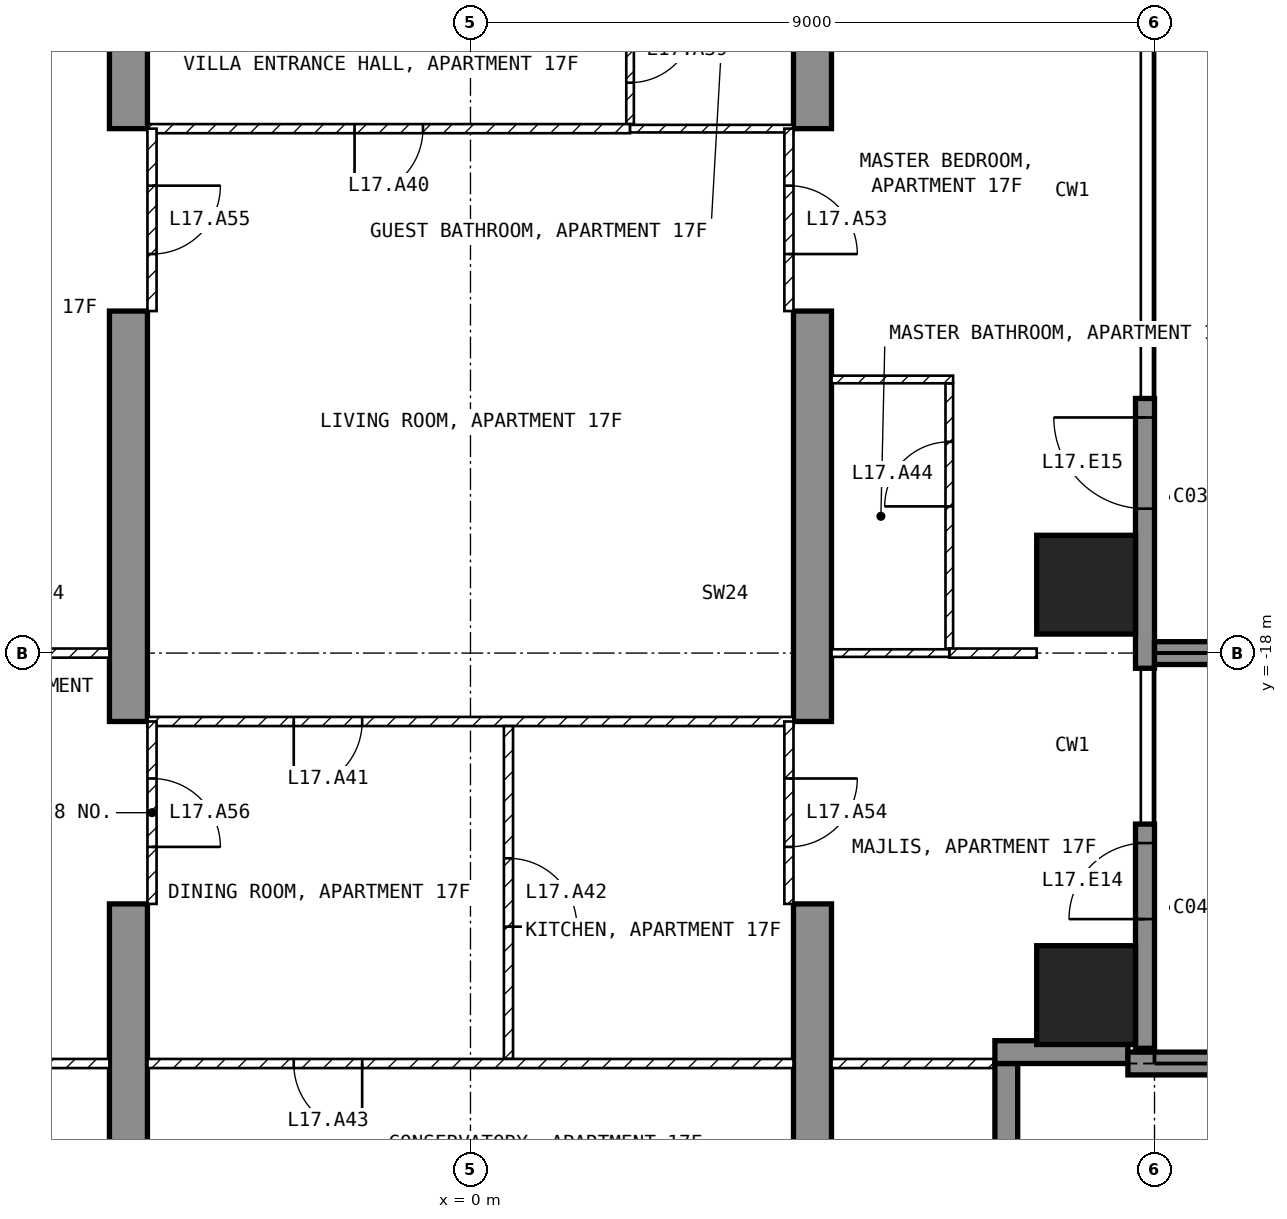
"""IFC4 building model, lengths in metres.
Left out: names, types, materials, properties, quantities, classifications, styles, units other than length and angle.
Written with IfcOpenShell. Run it as: python <this file> out.ifc"""

import sys

from ifc_helpers import new_model, si_unit, direction, frame, frame_2d, origin, origin_2d, place, context, subcontext, project, spatial, polyline, rectangle, outline, extrude, element, fill, save


model = new_model("IFC4")
c1 = context("Model", 3, precision=1e-05, world=origin(), true_north=direction((0.0, 1.0)))
c2 = subcontext(c1, "Body", "Model", "MODEL_VIEW")
j1 = project(units=[si_unit("LENGTHUNIT", "METRE"), si_unit("PLANEANGLEUNIT", "RADIAN")], contexts=[c1])
p1 = place(None, origin())
s1 = spatial("IfcSite", under=j1, at=p1, CompositionType="ELEMENT")
p2 = place(p1, origin())
s2 = spatial("IfcBuilding", under=s1, at=p2, CompositionType="ELEMENT")
p3 = place(p2, frame((0.0, 0.0, 78.5)))
s3 = spatial("IfcBuildingStorey", under=s2, at=p3, CompositionType="ELEMENT", Elevation=78.5)
for number, where, z_axis, x_axis in (
    (1, (8.1, -22.5, -0.25), (0.0, 0.0, 1.0), (1.0, 0.0, 0.0)),
    (2, (8.1, -17.1, -0.25), (0.0, 0.0, 1.0), (1.0, 0.0, 0.0)),
):
    element("IfcColumn", number, at=place(p3, frame(where, z_axis=z_axis, x_axis=x_axis)), inside=s3, PredefinedType="COLUMN", context=c2, shape_type="SweptSolid", body=[
        extrude(rectangle(XDim=1.3, YDim=1.3, at=origin_2d()), origin(), (0.0, 0.0, 1.0), 3.5),
    ])
for number, where, z_axis, x_axis in (
    (3, (-4.75, -25.45, -0.25), (1.0, 0.0, 0.0), (0.0, 1.0, 0.0)),
    (4, (4.25, -25.45, -0.25), (1.0, 0.0, 0.0), (0.0, 1.0, 0.0)),
):
    element("IfcWall", number, at=place(p3, frame(where, z_axis=z_axis, x_axis=x_axis)), inside=s3, PredefinedType="SHEAR", context=c2, shape_type="SweptSolid", body=[
        extrude(outline(polyline([(0.0, 0.0), (4.15, 0.0), (4.15, 2.65), (6.55, 2.65), (6.55, 0.0), (11.95, 0.0), (11.95, 2.65), (14.35, 2.65), (14.35, 0.0), (16.45, 0.0), (16.45, 3.5), (0.0, 3.5), (0.0, 0.0)])), origin(), (0.0, 0.0, 1.0), 0.5),
    ])
p4 = place(p3, frame((8.875, -23.2, 0.0), z_axis=(0.0, 0.0, 1.0), x_axis=(0.0, 1.0, 0.0)))
e5 = element("IfcWall", 5, at=p4, inside=s3, PredefinedType="SOLIDWALL", context=c2, shape_type="SweptSolid", body=[
    extrude(rectangle(XDim=2.95, YDim=0.25, at=frame_2d((1.475, 0.0))), origin(), (0.0, 0.0, 1.0), 3.25),
])
p5 = place(p4, frame((1.7, 0.0, 0.0)))
e6 = element("IfcOpeningElement", 6, at=p5, cuts=e5, PredefinedType="OPENING", context=c2, shape_type="SweptSolid", body=[
    extrude(rectangle(XDim=1.0, YDim=2.4, at=frame_2d((0.5, 1.2))), frame((0.0, 0.135, 0.0), z_axis=(0.0, -1.0, 0.0), x_axis=(1.0, 0.0, 0.0)), (0.0, 0.0, 1.0), 0.27),
])
p6 = place(p3, frame((8.875, -18.2, 0.0), z_axis=(0.0, 0.0, 1.0), x_axis=(0.0, 1.0, 0.0)))
e7 = element("IfcWall", 7, at=p6, inside=s3, PredefinedType="SOLIDWALL", context=c2, shape_type="SweptSolid", body=[
    extrude(rectangle(XDim=3.55, YDim=0.25, at=frame_2d((1.775, 0.0))), origin(), (0.0, 0.0, 1.0), 3.25),
])
p7 = place(p6, frame((2.1, 0.0, 0.0)))
e8 = element("IfcOpeningElement", 8, at=p7, cuts=e7, PredefinedType="OPENING", context=c2, shape_type="SweptSolid", body=[
    extrude(rectangle(XDim=1.2, YDim=2.4, at=frame_2d((0.6, 1.2))), frame((0.0, 0.135, 0.0), z_axis=(0.0, -1.0, 0.0), x_axis=(1.0, 0.0, 0.0)), (0.0, 0.0, 1.0), 0.27),
])
p8 = place(p3, frame((7.05, -25.2, 0.0), z_axis=(0.0, 0.0, 1.0), x_axis=(0.0, 1.0, 0.0)))
e9 = element("IfcWall", 9, at=p8, inside=s3, PredefinedType="SOLIDWALL", context=c2, shape_type="SweptSolid", body=[
    extrude(rectangle(XDim=1.8, YDim=0.3, at=frame_2d((0.9, 0.0))), origin(), (0.0, 0.0, 1.0), 3.25),
])
p9 = place(p3, frame((6.9, -23.25, 0.0), z_axis=(0.0, 0.0, 1.0), x_axis=(1.0, 0.0, 0.0)))
e10 = element("IfcWall", 10, at=p9, inside=s3, PredefinedType="SOLIDWALL", context=c2, shape_type="SweptSolid", body=[
    extrude(rectangle(XDim=1.75, YDim=0.3, at=frame_2d((0.875, 0.0))), origin(), (0.0, 0.0, 1.0), 3.25),
])
p10 = place(p3, frame((8.65, -23.4, 0.0), z_axis=(0.0, 0.0, 1.0), x_axis=(1.0, 0.0, 0.0)))
e11 = element("IfcWall", 11, at=p10, inside=s3, PredefinedType="SOLIDWALL", context=c2, shape_type="SweptSolid", body=[
    extrude(rectangle(XDim=3.05, YDim=0.3, at=frame_2d((1.525, 0.0))), origin(), (0.0, 0.0, 1.0), 3.25),
])
p11 = place(p3, frame((9.0, -18.0, 0.0), z_axis=(0.0, 0.0, 1.0), x_axis=(1.0, 0.0, 0.0)))
e12 = element("IfcWall", 12, at=p11, inside=s3, PredefinedType="SOLIDWALL", context=c2, shape_type="SweptSolid", body=[
    extrude(rectangle(XDim=2.7, YDim=0.3, at=frame_2d((1.35, 0.0))), origin(), (0.0, 0.0, 1.0), 3.25),
])
p12 = place(p3, frame((2.1, -9.1, 0.0), z_axis=(0.0, 0.0, 1.0), x_axis=(0.0, -1.0, 0.0)))
e13 = element("IfcWall", 13, at=p12, inside=s3, PredefinedType="PARTITIONING", context=c2, shape_type="SweptSolid", body=[
    extrude(rectangle(XDim=1.94, YDim=0.1, at=frame_2d((0.97, 0.0))), origin(), (0.0, 0.0, 1.0), 3.25),
])
p13 = place(p12, frame((0.545, 0.0, 0.0)))
e14 = element("IfcOpeningElement", 14, at=p13, cuts=e13, PredefinedType="OPENING", context=c2, shape_type="SweptSolid", body=[
    extrude(rectangle(XDim=0.85, YDim=2.1, at=frame_2d((0.425, 1.05))), frame((0.0, 0.06, 0.0), z_axis=(0.0, -1.0, 0.0), x_axis=(1.0, 0.0, 0.0)), (0.0, 0.0, 1.0), 0.12),
])
p14 = place(p3, frame((2.1, -11.1, 0.0), z_axis=(0.0, 0.0, 1.0), x_axis=(-1.0, 0.0, 0.0)))
e15 = element("IfcWall", 15, at=p14, inside=s3, PredefinedType="PARTITIONING", context=c2, shape_type="SweptSolid", body=[
    extrude(rectangle(XDim=6.35, YDim=0.12, at=frame_2d((3.175, 0.0))), origin(), (0.0, 0.0, 1.0), 3.25),
])
p15 = place(p14, frame((2.725, 0.0, 0.0)))
e16 = element("IfcOpeningElement", 16, at=p15, cuts=e15, PredefinedType="OPENING", context=c2, shape_type="SweptSolid", body=[
    extrude(rectangle(XDim=0.9, YDim=2.1, at=frame_2d((0.45, 1.05))), frame((0.0, 0.07, 0.0), z_axis=(0.0, -1.0, 0.0), x_axis=(1.0, 0.0, 0.0)), (0.0, 0.0, 1.0), 0.14),
])
p16 = place(p3, frame((4.25, -11.1, 0.0), z_axis=(0.0, 0.0, 1.0), x_axis=(-1.0, 0.0, 0.0)))
e17 = element("IfcWall", 17, at=p16, inside=s3, PredefinedType="PARTITIONING", context=c2, shape_type="SweptSolid", body=[
    extrude(rectangle(XDim=2.15, YDim=0.1, at=frame_2d((1.075, 0.0))), origin(), (0.0, 0.0, 1.0), 3.25),
])
p17 = place(p3, frame((4.25, -18.9, 0.0), z_axis=(0.0, 0.0, 1.0), x_axis=(-1.0, 0.0, 0.0)))
e18 = element("IfcWall", 18, at=p17, inside=s3, PredefinedType="PARTITIONING", context=c2, shape_type="SweptSolid", body=[
    extrude(rectangle(XDim=8.5, YDim=0.12, at=frame_2d((4.25, 0.0))), origin(), (0.0, 0.0, 1.0), 3.25),
])
p18 = place(p17, frame((5.675, 0.0, 0.0)))
e19 = element("IfcOpeningElement", 19, at=p18, cuts=e18, PredefinedType="OPENING", context=c2, shape_type="SweptSolid", body=[
    extrude(rectangle(XDim=0.9, YDim=2.1, at=frame_2d((0.45, 1.05))), frame((0.0, 0.07, 0.0), z_axis=(0.0, -1.0, 0.0), x_axis=(1.0, 0.0, 0.0)), (0.0, 0.0, 1.0), 0.14),
])
p19 = place(p3, frame((0.5, -18.96, 0.0), z_axis=(0.0, 0.0, 1.0), x_axis=(0.0, -1.0, 0.0)))
e20 = element("IfcWall", 20, at=p19, inside=s3, PredefinedType="PARTITIONING", context=c2, shape_type="SweptSolid", body=[
    extrude(rectangle(XDim=4.38, YDim=0.12, at=frame_2d((2.19, 0.0))), origin(), (0.0, 0.0, 1.0), 3.25),
])
p20 = place(p19, frame((1.74, 0.0, 0.0)))
e21 = element("IfcOpeningElement", 21, at=p20, cuts=e20, PredefinedType="OPENING", context=c2, shape_type="SweptSolid", body=[
    extrude(rectangle(XDim=0.9, YDim=2.1, at=frame_2d((0.45, 1.05))), frame((0.0, 0.07, 0.0), z_axis=(0.0, -1.0, 0.0), x_axis=(1.0, 0.0, 0.0)), (0.0, 0.0, 1.0), 0.14),
])
p21 = place(p3, frame((4.25, -23.4, 0.0), z_axis=(0.0, 0.0, 1.0), x_axis=(-1.0, 0.0, 0.0)))
e22 = element("IfcWall", 22, at=p21, inside=s3, PredefinedType="PARTITIONING", context=c2, shape_type="SweptSolid", body=[
    extrude(rectangle(XDim=8.5, YDim=0.12, at=frame_2d((4.25, 0.0))), origin(), (0.0, 0.0, 1.0), 3.25),
])
p22 = place(p21, frame((5.675, 0.0, 0.0)))
e23 = element("IfcOpeningElement", 23, at=p22, cuts=e22, PredefinedType="OPENING", context=c2, shape_type="SweptSolid", body=[
    extrude(rectangle(XDim=0.9, YDim=2.1, at=frame_2d((0.45, 1.05))), frame((0.0, 0.07, 0.0), z_axis=(0.0, -1.0, 0.0), x_axis=(1.0, 0.0, 0.0)), (0.0, 0.0, 1.0), 0.14),
])
p23 = place(p3, frame((6.3, -17.94, 0.0), z_axis=(0.0, 0.0, 1.0), x_axis=(0.0, 1.0, 0.0)))
e24 = element("IfcWall", 24, at=p23, inside=s3, PredefinedType="PARTITIONING", context=c2, shape_type="SweptSolid", body=[
    extrude(rectangle(XDim=3.49, YDim=0.1, at=frame_2d((1.745, 0.0))), origin(), (0.0, 0.0, 1.0), 3.25),
])
p24 = place(p23, frame((1.87, 0.0, 0.0)))
e25 = element("IfcOpeningElement", 25, at=p24, cuts=e24, PredefinedType="OPENING", context=c2, shape_type="SweptSolid", body=[
    extrude(rectangle(XDim=0.85, YDim=2.1, at=frame_2d((0.425, 1.05))), frame((0.0, 0.06, 0.0), z_axis=(0.0, -1.0, 0.0), x_axis=(1.0, 0.0, 0.0)), (0.0, 0.0, 1.0), 0.12),
])
p25 = place(p3, frame((6.35, -14.4, 0.0), z_axis=(0.0, 0.0, 1.0), x_axis=(-1.0, 0.0, 0.0)))
e26 = element("IfcWall", 26, at=p25, inside=s3, PredefinedType="PARTITIONING", context=c2, shape_type="SweptSolid", body=[
    extrude(rectangle(XDim=1.6, YDim=0.1, at=frame_2d((0.8, 0.0))), origin(), (0.0, 0.0, 1.0), 3.25),
])
p26 = place(p3, frame((7.45, -18.0, 0.0), z_axis=(0.0, 0.0, 1.0), x_axis=(-1.0, 0.0, 0.0)))
e27 = element("IfcWall", 27, at=p26, inside=s3, PredefinedType="PARTITIONING", context=c2, shape_type="SweptSolid", body=[
    extrude(rectangle(XDim=1.15, YDim=0.12, at=frame_2d((0.575, 0.0))), origin(), (0.0, 0.0, 1.0), 3.25),
])
p27 = place(p3, frame((6.3, -18.0, 0.0), z_axis=(0.0, 0.0, 1.0), x_axis=(-1.0, 0.0, 0.0)))
e28 = element("IfcWall", 28, at=p27, inside=s3, PredefinedType="PARTITIONING", context=c2, shape_type="SweptSolid", body=[
    extrude(rectangle(XDim=1.55, YDim=0.1, at=frame_2d((0.775, 0.0))), origin(), (0.0, 0.0, 1.0), 3.25),
])
p28 = place(p3, frame((7.12, -23.4, 0.0), z_axis=(0.0, 0.0, 1.0), x_axis=(-1.0, 0.0, 0.0)))
e29 = element("IfcWall", 29, at=p28, inside=s3, PredefinedType="PARTITIONING", context=c2, shape_type="SweptSolid", body=[
    extrude(rectangle(XDim=2.37, YDim=0.12, at=frame_2d((1.185, 0.0))), origin(), (0.0, 0.0, 1.0), 3.25),
])
p29 = place(p3, frame((-4.75, -18.0, 0.0), z_axis=(0.0, 0.0, 1.0), x_axis=(-1.0, 0.0, 0.0)))
e30 = element("IfcWall", 30, at=p29, inside=s3, PredefinedType="PARTITIONING", context=c2, shape_type="SweptSolid", body=[
    extrude(rectangle(XDim=2.7, YDim=0.12, at=frame_2d((1.35, 0.0))), origin(), (0.0, 0.0, 1.0), 3.25),
])
p30 = place(p3, frame((-4.75, -23.4, 0.0), z_axis=(0.0, 0.0, 1.0), x_axis=(-1.0, 0.0, 0.0)))
e31 = element("IfcWall", 31, at=p30, inside=s3, PredefinedType="PARTITIONING", context=c2, shape_type="SweptSolid", body=[
    extrude(rectangle(XDim=2.37, YDim=0.12, at=frame_2d((1.185, 0.0))), origin(), (0.0, 0.0, 1.0), 3.25),
])
p31 = place(p3, frame((4.19, -11.1, 0.0), z_axis=(0.0, 0.0, 1.0), x_axis=(0.0, -1.0, 0.0)))
e32 = element("IfcWall", 32, at=p31, inside=s3, PredefinedType="PARTITIONING", context=c2, shape_type="SweptSolid", body=[
    extrude(rectangle(XDim=2.4, YDim=0.12, at=frame_2d((1.2, 0.0))), origin(), (0.0, 0.0, 1.0), 2.4),
])
p32 = place(p31, frame((0.75, 0.0, 0.0)))
e33 = element("IfcOpeningElement", 33, at=p32, cuts=e32, PredefinedType="OPENING", context=c2, shape_type="SweptSolid", body=[
    extrude(rectangle(XDim=0.9, YDim=2.1, at=frame_2d((0.45, 1.05))), frame((0.0, 0.07, 0.0), z_axis=(0.0, -1.0, 0.0), x_axis=(1.0, 0.0, 0.0)), (0.0, 0.0, 1.0), 0.14),
])
p33 = place(p3, frame((4.19, -18.9, 0.0), z_axis=(0.0, 0.0, 1.0), x_axis=(0.0, -1.0, 0.0)))
e34 = element("IfcWall", 34, at=p33, inside=s3, PredefinedType="PARTITIONING", context=c2, shape_type="SweptSolid", body=[
    extrude(rectangle(XDim=2.4, YDim=0.12, at=frame_2d((1.2, 0.0))), origin(), (0.0, 0.0, 1.0), 2.4),
])
p34 = place(p33, frame((0.75, 0.0, 0.0)))
e35 = element("IfcOpeningElement", 35, at=p34, cuts=e34, PredefinedType="OPENING", context=c2, shape_type="SweptSolid", body=[
    extrude(rectangle(XDim=0.9, YDim=2.1, at=frame_2d((0.45, 1.05))), frame((0.0, 0.07, 0.0), z_axis=(0.0, -1.0, 0.0), x_axis=(1.0, 0.0, 0.0)), (0.0, 0.0, 1.0), 0.14),
])
p35 = place(p3, frame((-4.19, -11.1, 0.0), z_axis=(0.0, 0.0, 1.0), x_axis=(0.0, -1.0, 0.0)))
e36 = element("IfcWall", 36, at=p35, inside=s3, PredefinedType="PARTITIONING", context=c2, shape_type="SweptSolid", body=[
    extrude(rectangle(XDim=2.4, YDim=0.12, at=frame_2d((1.2, 0.0))), origin(), (0.0, 0.0, 1.0), 2.4),
])
p36 = place(p35, frame((0.75, 0.0, 0.0)))
e37 = element("IfcOpeningElement", 37, at=p36, cuts=e36, PredefinedType="OPENING", context=c2, shape_type="SweptSolid", body=[
    extrude(rectangle(XDim=0.9, YDim=2.1, at=frame_2d((0.45, 1.05))), frame((0.0, 0.07, 0.0), z_axis=(0.0, -1.0, 0.0), x_axis=(1.0, 0.0, 0.0)), (0.0, 0.0, 1.0), 0.14),
])
p37 = place(p3, frame((-4.19, -18.9, 0.0), z_axis=(0.0, 0.0, 1.0), x_axis=(0.0, -1.0, 0.0)))
e38 = element("IfcWall", 38, at=p37, inside=s3, PredefinedType="PARTITIONING", context=c2, shape_type="SweptSolid", body=[
    extrude(rectangle(XDim=2.4, YDim=0.12, at=frame_2d((1.2, 0.0))), origin(), (0.0, 0.0, 1.0), 2.4),
])
p38 = place(p37, frame((0.75, 0.0, 0.0)))
e39 = element("IfcOpeningElement", 39, at=p38, cuts=e38, PredefinedType="OPENING", context=c2, shape_type="SweptSolid", body=[
    extrude(rectangle(XDim=0.9, YDim=2.1, at=frame_2d((0.45, 1.05))), frame((0.0, 0.07, 0.0), z_axis=(0.0, -1.0, 0.0), x_axis=(1.0, 0.0, 0.0)), (0.0, 0.0, 1.0), 0.14),
])
p39 = place(p5, origin())
e40 = element("IfcDoor", 40, at=p39, inside=s3, OperationType="SINGLE_SWING_LEFT", PredefinedType="DOOR", context=c2, shape_type="SweptSolid", body=[
    extrude(rectangle(XDim=1.0, YDim=2.4, at=frame_2d((0.5, 1.2))), frame((0.0, 0.025, 0.0), z_axis=(0.0, -1.0, 0.0), x_axis=(1.0, 0.0, 0.0)), (0.0, 0.0, 1.0), 0.05),
])
fill(e6, e40)
p40 = place(p7, origin())
e41 = element("IfcDoor", 41, at=p40, inside=s3, OperationType="SINGLE_SWING_RIGHT", PredefinedType="DOOR", context=c2, shape_type="SweptSolid", body=[
    extrude(rectangle(XDim=1.2, YDim=2.4, at=frame_2d((0.6, 1.2))), frame((0.0, 0.025, 0.0), z_axis=(0.0, -1.0, 0.0), x_axis=(1.0, 0.0, 0.0)), (0.0, 0.0, 1.0), 0.05),
])
fill(e8, e41)
p41 = place(p13, origin())
e42 = element("IfcDoor", 42, at=p41, inside=s3, OperationType="SINGLE_SWING_LEFT", PredefinedType="DOOR", context=c2, shape_type="SweptSolid", body=[
    extrude(rectangle(XDim=0.85, YDim=2.1, at=frame_2d((0.425, 1.05))), frame((0.0, 0.025, 0.0), z_axis=(0.0, -1.0, 0.0), x_axis=(1.0, 0.0, 0.0)), (0.0, 0.0, 1.0), 0.05),
])
fill(e14, e42)
p42 = place(p15, origin())
e43 = element("IfcDoor", 43, at=p42, inside=s3, OperationType="SINGLE_SWING_RIGHT", PredefinedType="DOOR", context=c2, shape_type="SweptSolid", body=[
    extrude(rectangle(XDim=0.9, YDim=2.1, at=frame_2d((0.45, 1.05))), frame((0.0, 0.025, 0.0), z_axis=(0.0, -1.0, 0.0), x_axis=(1.0, 0.0, 0.0)), (0.0, 0.0, 1.0), 0.05),
])
fill(e16, e43)
p43 = place(p18, origin())
e44 = element("IfcDoor", 44, at=p43, inside=s3, OperationType="SINGLE_SWING_RIGHT", PredefinedType="DOOR", context=c2, shape_type="SweptSolid", body=[
    extrude(rectangle(XDim=0.9, YDim=2.1, at=frame_2d((0.45, 1.05))), frame((0.0, 0.025, 0.0), z_axis=(0.0, -1.0, 0.0), x_axis=(1.0, 0.0, 0.0)), (0.0, 0.0, 1.0), 0.05),
])
fill(e19, e44)
p44 = place(p20, origin())
e45 = element("IfcDoor", 45, at=p44, inside=s3, OperationType="SINGLE_SWING_RIGHT", PredefinedType="DOOR", context=c2, shape_type="SweptSolid", body=[
    extrude(rectangle(XDim=0.9, YDim=2.1, at=frame_2d((0.45, 1.05))), frame((0.0, 0.025, 0.0), z_axis=(0.0, -1.0, 0.0), x_axis=(1.0, 0.0, 0.0)), (0.0, 0.0, 1.0), 0.05),
])
fill(e21, e45)
p45 = place(p22, origin())
e46 = element("IfcDoor", 46, at=p45, inside=s3, OperationType="SINGLE_SWING_LEFT", PredefinedType="DOOR", context=c2, shape_type="SweptSolid", body=[
    extrude(rectangle(XDim=0.9, YDim=2.1, at=frame_2d((0.45, 1.05))), frame((0.0, 0.025, 0.0), z_axis=(0.0, -1.0, 0.0), x_axis=(1.0, 0.0, 0.0)), (0.0, 0.0, 1.0), 0.05),
])
fill(e23, e46)
p46 = place(p24, origin())
e47 = element("IfcDoor", 47, at=p46, inside=s3, OperationType="SINGLE_SWING_LEFT", PredefinedType="DOOR", context=c2, shape_type="SweptSolid", body=[
    extrude(rectangle(XDim=0.85, YDim=2.1, at=frame_2d((0.425, 1.05))), frame((0.0, 0.025, 0.0), z_axis=(0.0, -1.0, 0.0), x_axis=(1.0, 0.0, 0.0)), (0.0, 0.0, 1.0), 0.05),
])
fill(e25, e47)
p47 = place(p32, origin())
e48 = element("IfcDoor", 48, at=p47, inside=s3, OperationType="SINGLE_SWING_RIGHT", PredefinedType="DOOR", context=c2, shape_type="SweptSolid", body=[
    extrude(rectangle(XDim=0.9, YDim=2.1, at=frame_2d((0.45, 1.05))), frame((0.0, 0.025, 0.0), z_axis=(0.0, -1.0, 0.0), x_axis=(1.0, 0.0, 0.0)), (0.0, 0.0, 1.0), 0.05),
])
fill(e33, e48)
p48 = place(p34, origin())
e49 = element("IfcDoor", 49, at=p48, inside=s3, OperationType="SINGLE_SWING_LEFT", PredefinedType="DOOR", context=c2, shape_type="SweptSolid", body=[
    extrude(rectangle(XDim=0.9, YDim=2.1, at=frame_2d((0.45, 1.05))), frame((0.0, 0.025, 0.0), z_axis=(0.0, -1.0, 0.0), x_axis=(1.0, 0.0, 0.0)), (0.0, 0.0, 1.0), 0.05),
])
fill(e35, e49)
p49 = place(p36, origin())
e50 = element("IfcDoor", 50, at=p49, inside=s3, OperationType="SINGLE_SWING_LEFT", PredefinedType="DOOR", context=c2, shape_type="SweptSolid", body=[
    extrude(rectangle(XDim=0.9, YDim=2.1, at=frame_2d((0.45, 1.05))), frame((0.0, 0.025, 0.0), z_axis=(0.0, -1.0, 0.0), x_axis=(1.0, 0.0, 0.0)), (0.0, 0.0, 1.0), 0.05),
])
fill(e37, e50)
p50 = place(p38, origin())
e51 = element("IfcDoor", 51, at=p50, inside=s3, OperationType="SINGLE_SWING_RIGHT", PredefinedType="DOOR", context=c2, shape_type="SweptSolid", body=[
    extrude(rectangle(XDim=0.9, YDim=2.1, at=frame_2d((0.45, 1.05))), frame((0.0, 0.025, 0.0), z_axis=(0.0, -1.0, 0.0), x_axis=(1.0, 0.0, 0.0)), (0.0, 0.0, 1.0), 0.05),
])
fill(e39, e51)
save(model, sys.argv[1])
